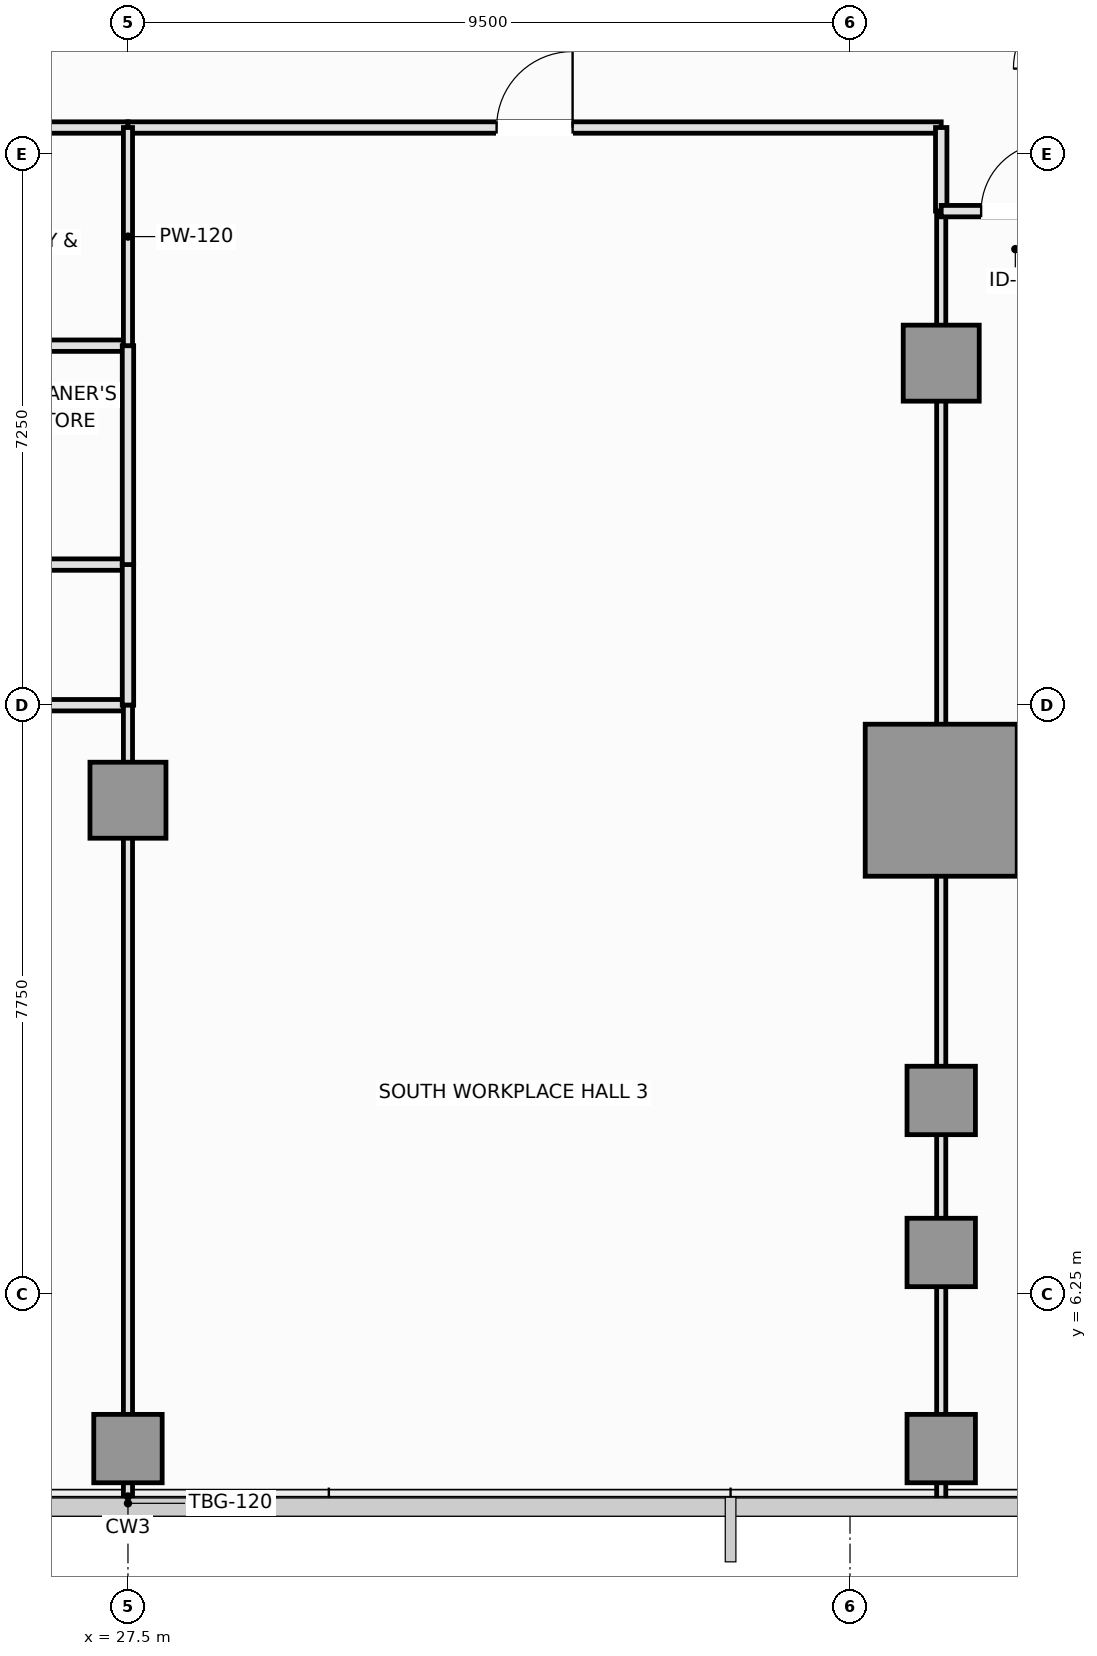
"""IFC4 building model, lengths in metres.
Left out: names, types, materials, properties, quantities, classifications, styles, units other than length and angle.
Written with IfcOpenShell. Run it as: python <this file> out.ifc"""

import sys

from ifc_helpers import new_model, si_unit, direction, frame, frame_2d, origin, origin_2d, place, context, subcontext, project, spatial, rectangle, extrude, element, fill, save


model = new_model("IFC4")
c1 = context("Model", 3, precision=1e-05, world=origin(), true_north=direction((0.0, 1.0)))
c2 = subcontext(c1, "Body", "Model", "MODEL_VIEW")
j1 = project(units=[si_unit("LENGTHUNIT", "METRE"), si_unit("PLANEANGLEUNIT", "RADIAN")], contexts=[c1])
p1 = place(None, origin())
s1 = spatial("IfcSite", under=j1, at=p1, CompositionType="ELEMENT")
p2 = place(p1, origin())
s2 = spatial("IfcBuilding", under=s1, at=p2, CompositionType="ELEMENT")
p3 = place(p2, frame((0.0, 0.0, 169.7)))
s3 = spatial("IfcBuildingStorey", under=s2, at=p3, CompositionType="ELEMENT", Elevation=169.7)
p4 = place(p3, frame((38.2, 12.75, 0.0), z_axis=(0.0, 0.0, 1.0), x_axis=(1.0, 0.0, 0.0)))
e1 = element("IfcColumn", 1, at=p4, inside=s3, PredefinedType="COLUMN", context=c2, shape_type="SweptSolid", body=[
    extrude(rectangle(XDim=2.0, YDim=2.0, at=origin_2d()), origin(), (0.0, 0.0, 1.0), 3.55),
])
for number, where, z_axis, x_axis in (
    (2, (27.5, 12.75, 0.0), (0.0, 0.0, 1.0), (1.0, 0.0, 0.0)),
    (3, (38.2, 18.5, 0.0), (0.0, 0.0, 1.0), (1.0, 0.0, 0.0)),
):
    element("IfcColumn", number, at=place(p3, frame(where, z_axis=z_axis, x_axis=x_axis)), inside=s3, PredefinedType="COLUMN", context=c2, shape_type="SweptSolid", body=[
        extrude(rectangle(XDim=1.0, YDim=1.0, at=origin_2d()), origin(), (0.0, 0.0, 1.0), 3.55),
    ])
for number, where, z_axis, x_axis in (
    (4, (38.2, 6.8, 0.0), (0.0, 0.0, 1.0), (1.0, 0.0, 0.0)),
    (5, (38.2, 8.8, 0.0), (0.0, 0.0, 1.0), (1.0, 0.0, 0.0)),
    (6, (27.5, 4.22, 0.0), (0.0, 0.0, 1.0), (1.0, 0.0, 0.0)),
    (7, (38.2, 4.22, 0.0), (0.0, 0.0, 1.0), (1.0, 0.0, 0.0)),
):
    element("IfcColumn", number, at=place(p3, frame(where, z_axis=z_axis, x_axis=x_axis)), inside=s3, PredefinedType="COLUMN", context=c2, shape_type="SweptSolid", body=[
        extrude(rectangle(XDim=0.9, YDim=0.9, at=origin_2d()), origin(), (0.0, 0.0, 1.0), 3.55),
    ])
p5 = place(p3, frame((23.6, 21.6, 0.0), z_axis=(0.0, 0.0, 1.0), x_axis=(1.0, 0.0, 0.0)))
e8 = element("IfcWall", 8, at=p5, inside=s3, PredefinedType="PARTITIONING", context=c2, shape_type="SweptSolid", body=[
    extrude(rectangle(XDim=3.9, YDim=0.15, at=frame_2d((1.95, 0.0))), origin(), (0.0, 0.0, 1.0), 3.35),
])
p6 = place(p5, frame((1.45, 0.0, 0.0)))
e9 = element("IfcOpeningElement", 9, at=p6, cuts=e8, PredefinedType="OPENING", context=c2, shape_type="SweptSolid", body=[
    extrude(rectangle(XDim=1.0, YDim=2.15, at=frame_2d((0.5, 1.075))), frame((0.0, 0.085, 0.0), z_axis=(0.0, -1.0, 0.0), x_axis=(1.0, 0.0, 0.0)), (0.0, 0.0, 1.0), 0.17),
])
p7 = place(p3, frame((27.5, 21.6, 0.0), z_axis=(0.0, 0.0, 1.0), x_axis=(1.0, 0.0, 0.0)))
e10 = element("IfcWall", 10, at=p7, inside=s3, PredefinedType="PARTITIONING", context=c2, shape_type="SweptSolid", body=[
    extrude(rectangle(XDim=10.7, YDim=0.15, at=frame_2d((5.35, 0.0))), origin(), (0.0, 0.0, 1.0), 3.35),
])
p8 = place(p7, frame((4.85, 0.0, 0.0)))
e11 = element("IfcOpeningElement", 11, at=p8, cuts=e10, PredefinedType="OPENING", context=c2, shape_type="SweptSolid", body=[
    extrude(rectangle(XDim=1.0, YDim=2.15, at=frame_2d((0.5, 1.075))), frame((0.0, 0.085, 0.0), z_axis=(0.0, -1.0, 0.0), x_axis=(1.0, 0.0, 0.0)), (0.0, 0.0, 1.0), 0.17),
])
p9 = place(p3, frame((23.6, 15.85, 0.0), z_axis=(0.0, 0.0, 1.0), x_axis=(1.0, 0.0, 0.0)))
e12 = element("IfcWall", 12, at=p9, inside=s3, PredefinedType="PLUMBINGWALL", context=c2, shape_type="SweptSolid", body=[
    extrude(rectangle(XDim=3.9, YDim=0.15, at=frame_2d((1.95, 0.0))), origin(), (0.0, 0.0, 1.0), 3.35),
])
p10 = place(p9, frame((1.5, 0.0, 0.0)))
e13 = element("IfcOpeningElement", 13, at=p10, cuts=e12, PredefinedType="OPENING", context=c2, shape_type="SweptSolid", body=[
    extrude(rectangle(XDim=0.9, YDim=2.1, at=frame_2d((0.45, 1.05))), frame((0.0, 0.085, 0.0), z_axis=(0.0, -1.0, 0.0), x_axis=(1.0, 0.0, 0.0)), (0.0, 0.0, 1.0), 0.17),
])
p11 = place(p3, frame((19.95, 14.0, 0.0), z_axis=(0.0, 0.0, 1.0), x_axis=(1.0, 0.0, 0.0)))
e14 = element("IfcWall", 14, at=p11, inside=s3, PredefinedType="PARTITIONING", context=c2, shape_type="SweptSolid", body=[
    extrude(rectangle(XDim=7.55, YDim=0.15, at=frame_2d((3.775, 0.0))), origin(), (0.0, 0.0, 1.0), 3.35),
])
p12 = place(p11, frame((3.275, 0.0, 0.0)))
e15 = element("IfcOpeningElement", 15, at=p12, cuts=e14, PredefinedType="OPENING", context=c2, shape_type="SweptSolid", body=[
    extrude(rectangle(XDim=1.0, YDim=2.15, at=frame_2d((0.5, 1.075))), frame((0.0, 0.085, 0.0), z_axis=(0.0, -1.0, 0.0), x_axis=(1.0, 0.0, 0.0)), (0.0, 0.0, 1.0), 0.17),
])
p13 = place(p3, frame((27.5, 14.0, 0.0), z_axis=(0.0, 0.0, 1.0), x_axis=(0.0, 1.0, 0.0)))
e16 = element("IfcWall", 16, at=p13, inside=s3, PredefinedType="PARTITIONING", context=c2, shape_type="SweptSolid", body=[
    extrude(rectangle(XDim=1.85, YDim=0.15, at=frame_2d((0.925, 0.0))), origin(), (0.0, 0.0, 1.0), 3.35),
])
p14 = place(p3, frame((23.6, 18.73, 0.0), z_axis=(0.0, 0.0, 1.0), x_axis=(1.0, 0.0, 0.0)))
e17 = element("IfcWall", 17, at=p14, inside=s3, PredefinedType="PLUMBINGWALL", context=c2, shape_type="SweptSolid", body=[
    extrude(rectangle(XDim=3.9, YDim=0.15, at=frame_2d((1.95, 0.0))), origin(), (0.0, 0.0, 1.0), 3.35),
])
p15 = place(p3, frame((27.5, 15.85, 0.0), z_axis=(0.0, 0.0, 1.0), x_axis=(0.0, 1.0, 0.0)))
e18 = element("IfcWall", 18, at=p15, inside=s3, PredefinedType="PLUMBINGWALL", context=c2, shape_type="SweptSolid", body=[
    extrude(rectangle(XDim=2.88, YDim=0.15, at=frame_2d((1.44, 0.0))), origin(), (0.0, 0.0, 1.0), 3.35),
])
p16 = place(p3, frame((27.5, 18.73, 0.0), z_axis=(0.0, 0.0, 1.0), x_axis=(0.0, 1.0, 0.0)))
e19 = element("IfcWall", 19, at=p16, inside=s3, PredefinedType="PARTITIONING", context=c2, shape_type="SweptSolid", body=[
    extrude(rectangle(XDim=2.87, YDim=0.12, at=frame_2d((1.435, 0.0))), origin(), (0.0, 0.0, 1.0), 3.35),
])
p17 = place(p3, frame((27.5, 3.51, 0.0), z_axis=(0.0, 0.0, 1.0), x_axis=(0.0, 1.0, 0.0)))
e20 = element("IfcWall", 20, at=p17, inside=s3, PredefinedType="PARTITIONING", context=c2, shape_type="SweptSolid", body=[
    extrude(rectangle(XDim=10.49, YDim=0.12, at=frame_2d((5.245, 0.0))), origin(), (0.0, 0.0, 1.0), 2.85),
])
p18 = place(p3, frame((38.2, 20.5, 0.0), z_axis=(0.0, 0.0, 1.0), x_axis=(0.0, 1.0, 0.0)))
e21 = element("IfcWall", 21, at=p18, inside=s3, PredefinedType="PARTITIONING", context=c2, shape_type="SweptSolid", body=[
    extrude(rectangle(XDim=1.1, YDim=0.15, at=frame_2d((0.55, 0.0))), origin(), (0.0, 0.0, 1.0), 2.85),
])
p19 = place(p3, frame((38.2, 3.51, 0.0), z_axis=(0.0, 0.0, 1.0), x_axis=(0.0, 1.0, 0.0)))
e22 = element("IfcWall", 22, at=p19, inside=s3, PredefinedType="PARTITIONING", context=c2, shape_type="SweptSolid", body=[
    extrude(rectangle(XDim=16.99, YDim=0.12, at=frame_2d((8.495, 0.0))), origin(), (0.0, 0.0, 1.0), 2.85),
])
p20 = place(p3, frame((38.2, 20.5, 0.0), z_axis=(0.0, 0.0, 1.0), x_axis=(1.0, 0.0, 0.0)))
e23 = element("IfcWall", 23, at=p20, inside=s3, PredefinedType="PARTITIONING", context=c2, shape_type="SweptSolid", body=[
    extrude(rectangle(XDim=1.95, YDim=0.15, at=frame_2d((0.975, 0.0))), origin(), (0.0, 0.0, 1.0), 3.35),
])
p21 = place(p20, frame((0.525, 0.0, 0.0)))
e24 = element("IfcOpeningElement", 24, at=p21, cuts=e23, PredefinedType="OPENING", context=c2, shape_type="SweptSolid", body=[
    extrude(rectangle(XDim=0.9, YDim=2.1, at=frame_2d((0.45, 1.05))), frame((0.0, 0.085, 0.0), z_axis=(0.0, -1.0, 0.0), x_axis=(1.0, 0.0, 0.0)), (0.0, 0.0, 1.0), 0.17),
])
p22 = place(p8, origin())
e25 = element("IfcDoor", 25, at=p22, inside=s3, OperationType="SINGLE_SWING_RIGHT", PredefinedType="DOOR", context=c2, shape_type="SweptSolid", body=[
    extrude(rectangle(XDim=1.0, YDim=2.15, at=frame_2d((0.5, 1.075))), frame((0.0, 0.025, 0.0), z_axis=(0.0, -1.0, 0.0), x_axis=(1.0, 0.0, 0.0)), (0.0, 0.0, 1.0), 0.05),
])
fill(e11, e25)
p23 = place(p21, origin())
e26 = element("IfcDoor", 26, at=p23, inside=s3, OperationType="SINGLE_SWING_RIGHT", PredefinedType="DOOR", context=c2, shape_type="SweptSolid", body=[
    extrude(rectangle(XDim=0.9, YDim=2.1, at=frame_2d((0.45, 1.05))), frame((0.0, 0.025, 0.0), z_axis=(0.0, -1.0, 0.0), x_axis=(1.0, 0.0, 0.0)), (0.0, 0.0, 1.0), 0.05),
])
fill(e24, e26)
save(model, sys.argv[1])
